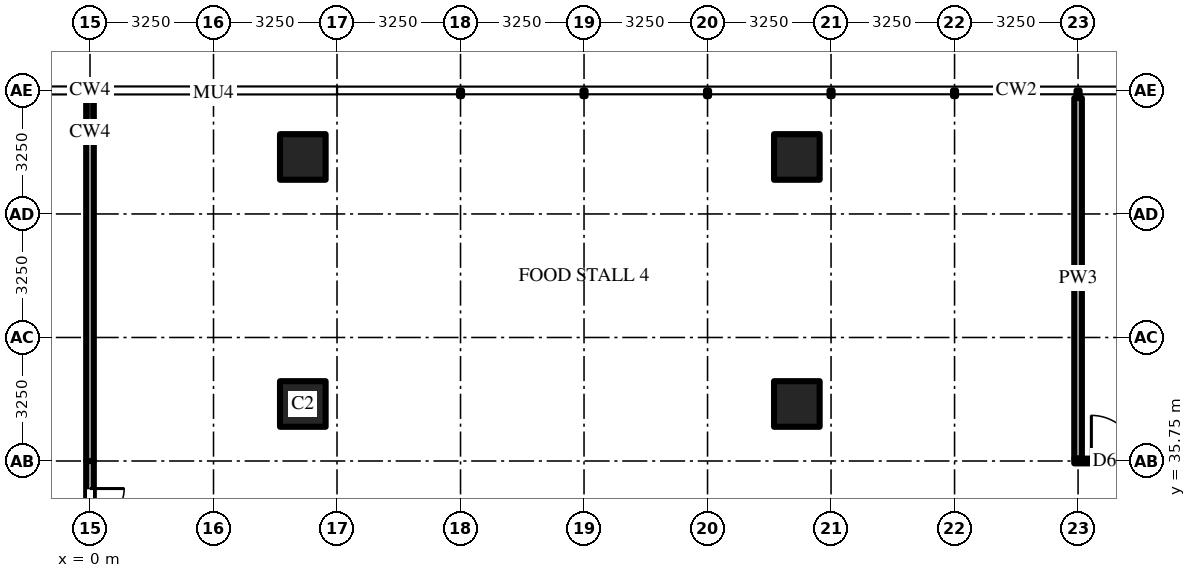
"""IFC4 building model, lengths in metres.
Left out: names, types, materials, properties, quantities, classifications, styles, units other than length and angle.
Written with IfcOpenShell. Run it as: python <this file> out.ifc"""

import sys

from ifc_helpers import new_model, si_unit, direction, frame, frame_2d, origin, origin_2d, place, context, subcontext, project, spatial, rectangle, extrude, source, transform, mapped, element, fill, save


model = new_model("IFC4")
c1 = context("Model", 3, precision=1e-05, world=origin(), true_north=direction((0.0, 1.0)))
c2 = subcontext(c1, "Body", "Model", "MODEL_VIEW")
j1 = project(units=[si_unit("LENGTHUNIT", "METRE"), si_unit("PLANEANGLEUNIT", "RADIAN")], contexts=[c1])
p1 = place(None, origin())
s1 = spatial("IfcSite", under=j1, at=p1, CompositionType="ELEMENT")
p2 = place(p1, origin())
s2 = spatial("IfcBuilding", under=s1, at=p2, CompositionType="ELEMENT")
p3 = place(p2, frame((0.0, 0.0, 8.0)))
s3 = spatial("IfcBuildingStorey", under=s2, at=p3, CompositionType="ELEMENT", Elevation=8.0)
m1 = source(origin(), c2, "Body", "SweptSolid", [
    extrude(rectangle(XDim=1.2, YDim=1.2, at=origin_2d()), origin(), (0.0, 0.0, 1.0), 6.0),
])
for number, where, z_axis, x_axis in (
    (1, (5.6, 37.25, 0.0), (0.0, 0.0, 1.0), (1.0, 0.0, 0.0)),
    (2, (5.6, 43.75, 0.0), (0.0, 0.0, 1.0), (1.0, 0.0, 0.0)),
    (3, (18.6, 37.25, 0.0), (0.0, 0.0, 1.0), (1.0, 0.0, 0.0)),
    (4, (18.6, 43.75, 0.0), (0.0, 0.0, 1.0), (1.0, 0.0, 0.0)),
):
    element("IfcColumn", number, at=place(p3, frame(where, z_axis=z_axis, x_axis=x_axis)), inside=s3, PredefinedType="COLUMN", context=c2, shape_type="MappedRepresentation", body=[
        mapped(m1, transform((0.0, 0.0, 0.0))),
    ])
m2 = source(origin(), c2, "Body", "SweptSolid", [
    extrude(rectangle(XDim=3.25, YDim=0.2, at=frame_2d((1.625, 0.0))), origin(), (0.0, 0.0, 1.0), 4.997),
])
p4 = place(p3, frame((0.0, 35.75, 0.0), z_axis=(0.0, 0.0, 1.0), x_axis=(0.0, -1.0, 0.0)))
e5 = element("IfcWall", 5, at=p4, inside=s3, PredefinedType="PARTITIONING", context=c2, shape_type="MappedRepresentation", body=[
    mapped(m2, transform((0.0, 0.0, 0.0))),
])
m3 = source(origin(), c2, "Body", "SweptSolid", [
    extrude(rectangle(XDim=1.8, YDim=2.1, at=frame_2d((0.9, 1.05))), frame((0.0, 0.11, 0.0), z_axis=(0.0, -1.0, 0.0), x_axis=(1.0, 0.0, 0.0)), (0.0, 0.0, 1.0), 0.22),
])
p5 = place(p4, frame((0.725, 0.0, 0.0)))
e6 = element("IfcOpeningElement", 6, at=p5, cuts=e5, PredefinedType="OPENING", context=c2, shape_type="MappedRepresentation", body=[
    mapped(m3, transform((0.0, 0.0, 0.0))),
])
m4 = source(origin(), c2, "Body", "SweptSolid", [
    extrude(rectangle(XDim=9.55, YDim=0.2, at=frame_2d((4.775, 0.0))), origin(), (0.0, 0.0, 1.0), 4.918),
])
p6 = place(p3, frame((0.0, 45.3, 0.0), z_axis=(0.0, 0.0, 1.0), x_axis=(0.0, -1.0, 0.0)))
e7 = element("IfcWall", 7, at=p6, inside=s3, PredefinedType="PARTITIONING", context=c2, shape_type="MappedRepresentation", body=[
    mapped(m4, transform((0.0, 0.0, 0.0))),
])
m5 = source(origin(), c2, "Body", "SweptSolid", [
    extrude(rectangle(XDim=9.488, YDim=0.2, at=frame_2d((4.744, 0.0))), origin(), (0.0, 0.0, 1.0), 4.839),
])
p7 = place(p3, frame((26.0, 35.812, 0.0), z_axis=(0.0, 0.0, 1.0), x_axis=(0.0, 1.0, 0.0)))
e8 = element("IfcWall", 8, at=p7, inside=s3, PredefinedType="PARTITIONING", context=c2, shape_type="MappedRepresentation", body=[
    mapped(m5, transform((0.0, 0.0, 0.0))),
])
m6 = source(origin(), c2, "Body", "SweptSolid", [
    extrude(rectangle(XDim=9.85, YDim=0.125, at=frame_2d((4.925, 0.0))), origin(), (0.0, 0.0, 1.0), 4.997),
])
p8 = place(p3, frame((25.9, 35.75, 0.0), z_axis=(0.0, 0.0, 1.0), x_axis=(1.0, 0.0, 0.0)))
e9 = element("IfcWall", 9, at=p8, inside=s3, PredefinedType="PARTITIONING", context=c2, shape_type="MappedRepresentation", body=[
    mapped(m6, transform((0.0, 0.0, 0.0))),
])
m7 = source(origin(), c2, "Body", "SweptSolid", [
    extrude(rectangle(XDim=1.2, YDim=2.1, at=frame_2d((0.6, 1.05))), frame((0.0, 0.073, 0.0), z_axis=(0.0, -1.0, 0.0), x_axis=(1.0, 0.0, 0.0)), (0.0, 0.0, 1.0), 0.145),
])
p9 = place(p8, frame((0.45, 0.0, 0.0)))
e10 = element("IfcOpeningElement", 10, at=p9, cuts=e9, PredefinedType="OPENING", context=c2, shape_type="MappedRepresentation", body=[
    mapped(m7, transform((0.0, 0.0, 0.0))),
])
m8 = source(origin(), c2, "Body", "SweptSolid", [
    extrude(rectangle(XDim=1.8, YDim=2.1, at=frame_2d((0.9, 1.05))), frame((0.0, 0.025, 0.0), z_axis=(0.0, -1.0, 0.0), x_axis=(1.0, 0.0, 0.0)), (0.0, 0.0, 1.0), 0.05),
])
p10 = place(p5, origin())
e11 = element("IfcDoor", 11, at=p10, inside=s3, OperationType="DOUBLE_DOOR_SINGLE_SWING", PredefinedType="DOOR", context=c2, shape_type="MappedRepresentation", body=[
    mapped(m8, transform((0.0, 0.0, 0.0))),
])
fill(e6, e11)
m9 = source(origin(), c2, "Body", "SweptSolid", [
    extrude(rectangle(XDim=1.2, YDim=2.1, at=frame_2d((0.6, 1.05))), frame((0.0, 0.025, 0.0), z_axis=(0.0, -1.0, 0.0), x_axis=(1.0, 0.0, 0.0)), (0.0, 0.0, 1.0), 0.05),
])
p11 = place(p9, origin())
e12 = element("IfcDoor", 12, at=p11, inside=s3, OperationType="SINGLE_SWING_LEFT", PredefinedType="DOOR", context=c2, shape_type="MappedRepresentation", body=[
    mapped(m9, transform((0.0, 0.0, 0.0))),
])
fill(e10, e12)
save(model, sys.argv[1])
